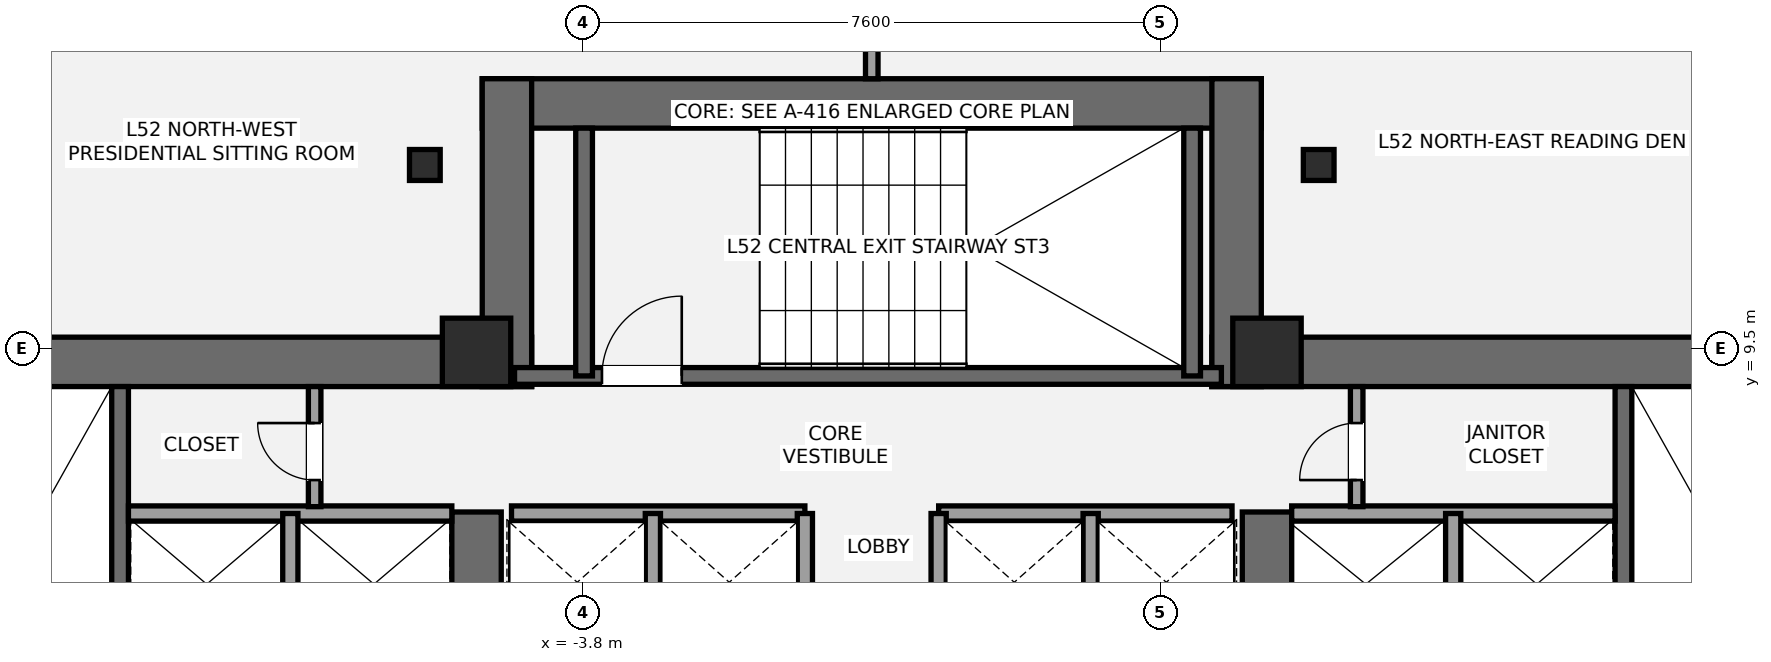
"""IFC4 building model, lengths in metres.
Left out: names, types, materials, properties, quantities, classifications, styles, units other than length and angle.
Written with IfcOpenShell. Run it as: python <this file> out.ifc"""

import sys

from ifc_helpers import new_model, si_unit, direction, frame, frame_2d, origin, origin_2d, place, context, subcontext, project, spatial, rectangle, i_section, extrude, element, fill, save


model = new_model("IFC4")
c1 = context("Model", 3, precision=1e-05, world=origin(), true_north=direction((0.0, 1.0)))
c2 = subcontext(c1, "Body", "Model", "MODEL_VIEW")
j1 = project(units=[si_unit("LENGTHUNIT", "METRE"), si_unit("PLANEANGLEUNIT", "RADIAN")], contexts=[c1])
p1 = place(None, origin())
s1 = spatial("IfcSite", under=j1, at=p1, CompositionType="ELEMENT")
p2 = place(p1, origin())
s2 = spatial("IfcBuilding", under=s1, at=p2, CompositionType="ELEMENT")
p3 = place(p2, frame((0.0, 0.0, 188.6)))
s3 = spatial("IfcBuildingStorey", under=s2, at=p3, CompositionType="ELEMENT", Elevation=188.6)
p4 = place(p3, frame((-13.8, 9.325, 0.0), z_axis=(0.0, 0.0, 1.0), x_axis=(1.0, 0.0, 0.0)))
e1 = element("IfcWall", 1, at=p4, inside=s3, PredefinedType="SHEAR", context=c2, shape_type="SweptSolid", body=[
    extrude(rectangle(XDim=9.325, YDim=0.65, at=frame_2d((4.663, 0.0))), origin(), (0.0, 0.0, 1.0), 3.2),
])
p5 = place(p3, frame((-5.2, 5.35, 0.0), z_axis=(0.0, 0.0, 1.0), x_axis=(0.0, 1.0, 0.0)))
e2 = element("IfcWall", 2, at=p5, inside=s3, PredefinedType="SHEAR", context=c2, shape_type="SweptSolid", body=[
    extrude(rectangle(XDim=2.0, YDim=0.65, at=frame_2d((1.0, 0.0))), origin(), (0.0, 0.0, 1.0), 3.2),
])
p6 = place(p3, frame((-9.89, 1.85, 0.0), z_axis=(0.0, 0.0, 1.0), x_axis=(0.0, 1.0, 0.0)))
e3 = element("IfcWall", 3, at=p6, inside=s3, PredefinedType="SHEAR", context=c2, shape_type="SweptSolid", body=[
    extrude(rectangle(XDim=7.15, YDim=0.22, at=frame_2d((3.575, 0.0))), origin(), (0.0, 0.0, 1.0), 3.2),
])
p7 = place(p3, frame((4.475, 9.325, 0.0), z_axis=(0.0, 0.0, 1.0), x_axis=(1.0, 0.0, 0.0)))
e4 = element("IfcWall", 4, at=p7, inside=s3, PredefinedType="SHEAR", context=c2, shape_type="SweptSolid", body=[
    extrude(rectangle(XDim=9.325, YDim=0.65, at=frame_2d((4.663, 0.0))), origin(), (0.0, 0.0, 1.0), 3.2),
])
p8 = place(p3, frame((5.2, 5.35, 0.0), z_axis=(0.0, 0.0, 1.0), x_axis=(0.0, 1.0, 0.0)))
e5 = element("IfcWall", 5, at=p8, inside=s3, PredefinedType="SHEAR", context=c2, shape_type="SweptSolid", body=[
    extrude(rectangle(XDim=2.0, YDim=0.65, at=frame_2d((1.0, 0.0))), origin(), (0.0, 0.0, 1.0), 3.2),
])
p9 = place(p3, frame((9.89, 1.85, 0.0), z_axis=(0.0, 0.0, 1.0), x_axis=(0.0, 1.0, 0.0)))
e6 = element("IfcWall", 6, at=p9, inside=s3, PredefinedType="SHEAR", context=c2, shape_type="SweptSolid", body=[
    extrude(rectangle(XDim=7.15, YDim=0.22, at=frame_2d((3.575, 0.0))), origin(), (0.0, 0.0, 1.0), 3.2),
])
p10 = place(p3, frame((-5.125, 12.725, 0.0), z_axis=(0.0, 0.0, 1.0), x_axis=(1.0, 0.0, 0.0)))
e7 = element("IfcWall", 7, at=p10, inside=s3, PredefinedType="SHEAR", context=c2, shape_type="SweptSolid", body=[
    extrude(rectangle(XDim=10.25, YDim=0.65, at=frame_2d((5.125, 0.0))), origin(), (0.0, 0.0, 1.0), 3.2),
])
for number, where, z_axis, x_axis in (
    (8, (-4.8, 9.0, 0.0), (0.0, 0.0, 1.0), (0.0, 1.0, 0.0)),
    (9, (4.8, 9.0, 0.0), (0.0, 0.0, 1.0), (0.0, 1.0, 0.0)),
):
    element("IfcWall", number, at=place(p3, frame(where, z_axis=z_axis, x_axis=x_axis)), inside=s3, PredefinedType="SHEAR", context=c2, shape_type="SweptSolid", body=[
        extrude(rectangle(XDim=4.05, YDim=0.65, at=frame_2d((2.025, 0.0))), origin(), (0.0, 0.0, 1.0), 3.2),
    ])
p11 = place(p3, frame((-4.7, 9.14, 0.0), z_axis=(0.0, 0.0, 1.0), x_axis=(1.0, 0.0, 0.0)))
e10 = element("IfcWall", 10, at=p11, inside=s3, PredefinedType="SHEAR", context=c2, shape_type="SweptSolid", body=[
    extrude(rectangle(XDim=9.3, YDim=0.22, at=frame_2d((4.65, 0.0))), origin(), (0.0, 0.0, 1.0), 3.2),
])
p12 = place(p11, frame((1.15, 0.0, 0.0)))
e11 = element("IfcOpeningElement", 11, at=p12, cuts=e10, PredefinedType="OPENING", context=c2, shape_type="SweptSolid", body=[
    extrude(rectangle(XDim=1.05, YDim=2.15, at=frame_2d((0.525, 1.075))), frame((0.0, 0.12, 0.0), z_axis=(0.0, -1.0, 0.0), x_axis=(1.0, 0.0, 0.0)), (0.0, 0.0, 1.0), 0.24),
])
for number, where, z_axis, x_axis in (
    (12, (-3.785, 9.14, 0.0), (0.0, 0.0, 1.0), (0.0, 1.0, 0.0)),
    (13, (4.215, 9.14, 0.0), (0.0, 0.0, 1.0), (0.0, 1.0, 0.0)),
):
    element("IfcWall", number, at=place(p3, frame(where, z_axis=z_axis, x_axis=x_axis)), inside=s3, PredefinedType="SHEAR", context=c2, shape_type="SweptSolid", body=[
        extrude(rectangle(XDim=3.26, YDim=0.22, at=frame_2d((1.63, 0.0))), origin(), (0.0, 0.0, 1.0), 3.2),
    ])
for number, where, z_axis, x_axis in (
    (14, (-5.2, 9.45, 0.0), (0.0, 0.0, 1.0), (1.0, 0.0, 0.0)),
    (15, (5.2, 9.45, 0.0), (0.0, 0.0, 1.0), (1.0, 0.0, 0.0)),
):
    element("IfcColumn", number, at=place(p3, frame(where, z_axis=z_axis, x_axis=x_axis)), inside=s3, PredefinedType="COLUMN", context=c2, shape_type="SweptSolid", body=[
        extrude(rectangle(XDim=0.9, YDim=0.9, at=origin_2d()), origin(), (0.0, 0.0, 1.0), 3.2),
    ])
for number, where, z_axis, x_axis in (
    (16, (5.88, 11.915, 0.0), (0.0, 0.0, 1.0), (1.0, 0.0, 0.0)),
    (17, (-5.88, 11.915, 0.0), (0.0, 0.0, 1.0), (1.0, 0.0, 0.0)),
):
    element("IfcColumn", number, at=place(p3, frame(where, z_axis=z_axis, x_axis=x_axis)), inside=s3, PredefinedType="COLUMN", context=c2, shape_type="SweptSolid", body=[
        extrude(i_section(OverallWidth=0.404, OverallDepth=0.407, WebThickness=0.027, FlangeThickness=0.044, at=origin_2d()), origin(), (0.0, 0.0, 1.0), 3.2),
    ])
p13 = place(p3, frame((-9.78, 7.33, 0.0), z_axis=(0.0, 0.0, 1.0), x_axis=(1.0, 0.0, 0.0)))
e18 = element("IfcWall", 18, at=p13, inside=s3, PredefinedType="SOLIDWALL", context=c2, shape_type="SweptSolid", body=[
    extrude(rectangle(XDim=4.255, YDim=0.2, at=frame_2d((2.127, 0.0))), origin(), (0.0, 0.0, 1.0), 3.02),
])
p14 = place(p3, frame((-7.65, 5.47, 0.0), z_axis=(0.0, 0.0, 1.0), x_axis=(0.0, 1.0, 0.0)))
e19 = element("IfcWall", 19, at=p14, inside=s3, PredefinedType="SOLIDWALL", context=c2, shape_type="SweptSolid", body=[
    extrude(rectangle(XDim=1.86, YDim=0.2, at=frame_2d((0.93, 0.0))), origin(), (0.0, 0.0, 1.0), 3.02),
])
p15 = place(p3, frame((5.525, 7.33, 0.0), z_axis=(0.0, 0.0, 1.0), x_axis=(1.0, 0.0, 0.0)))
e20 = element("IfcWall", 20, at=p15, inside=s3, PredefinedType="SOLIDWALL", context=c2, shape_type="SweptSolid", body=[
    extrude(rectangle(XDim=4.255, YDim=0.2, at=frame_2d((2.127, 0.0))), origin(), (0.0, 0.0, 1.0), 3.02),
])
p16 = place(p3, frame((7.65, 5.47, 0.0), z_axis=(0.0, 0.0, 1.0), x_axis=(0.0, 1.0, 0.0)))
e21 = element("IfcWall", 21, at=p16, inside=s3, PredefinedType="SOLIDWALL", context=c2, shape_type="SweptSolid", body=[
    extrude(rectangle(XDim=1.86, YDim=0.2, at=frame_2d((0.93, 0.0))), origin(), (0.0, 0.0, 1.0), 3.02),
])
for number, where, z_axis, x_axis in (
    (22, (-4.74, 7.33, 0.0), (0.0, 0.0, 1.0), (1.0, 0.0, 0.0)),
    (23, (0.88, 7.33, 0.0), (0.0, 0.0, 1.0), (1.0, 0.0, 0.0)),
):
    element("IfcWall", number, at=place(p3, frame(where, z_axis=z_axis, x_axis=x_axis)), inside=s3, PredefinedType="SOLIDWALL", context=c2, shape_type="SweptSolid", body=[
        extrude(rectangle(XDim=3.86, YDim=0.2, at=frame_2d((1.93, 0.0))), origin(), (0.0, 0.0, 1.0), 3.02),
    ])
for number, where, z_axis, x_axis in (
    (24, (-2.88, 5.52, 0.0), (0.0, 0.0, 1.0), (0.0, 1.0, 0.0)),
    (25, (2.88, 5.52, 0.0), (0.0, 0.0, 1.0), (0.0, 1.0, 0.0)),
    (26, (-0.88, 5.52, 0.0), (0.0, 0.0, 1.0), (0.0, 1.0, 0.0)),
    (27, (0.88, 5.52, 0.0), (0.0, 0.0, 1.0), (0.0, 1.0, 0.0)),
):
    element("IfcWall", number, at=place(p3, frame(where, z_axis=z_axis, x_axis=x_axis)), inside=s3, PredefinedType="SOLIDWALL", context=c2, shape_type="SweptSolid", body=[
        extrude(rectangle(XDim=1.81, YDim=0.2, at=frame_2d((0.905, 0.0))), origin(), (0.0, 0.0, 1.0), 3.02),
    ])
p17 = place(p3, frame((-7.33, 7.42, 0.0), z_axis=(0.0, 0.0, 1.0), x_axis=(0.0, 1.0, 0.0)))
e28 = element("IfcWall", 28, at=p17, inside=s3, PredefinedType="PARTITIONING", context=c2, shape_type="SweptSolid", body=[
    extrude(rectangle(XDim=1.58, YDim=0.165, at=frame_2d((0.79, 0.0))), origin(), (0.0, 0.0, 1.0), 3.02),
])
p18 = place(p17, frame((0.35, 0.0, 0.0)))
e29 = element("IfcOpeningElement", 29, at=p18, cuts=e28, PredefinedType="OPENING", context=c2, shape_type="SweptSolid", body=[
    extrude(rectangle(XDim=0.75, YDim=2.1, at=frame_2d((0.375, 1.05))), frame((0.0, 0.093, 0.0), z_axis=(0.0, -1.0, 0.0), x_axis=(1.0, 0.0, 0.0)), (0.0, 0.0, 1.0), 0.185),
])
p19 = place(p3, frame((6.38, 7.42, 0.0), z_axis=(0.0, 0.0, 1.0), x_axis=(0.0, 1.0, 0.0)))
e30 = element("IfcWall", 30, at=p19, inside=s3, PredefinedType="PARTITIONING", context=c2, shape_type="SweptSolid", body=[
    extrude(rectangle(XDim=1.58, YDim=0.165, at=frame_2d((0.79, 0.0))), origin(), (0.0, 0.0, 1.0), 3.02),
])
p20 = place(p19, frame((0.35, 0.0, 0.0)))
e31 = element("IfcOpeningElement", 31, at=p20, cuts=e30, PredefinedType="OPENING", context=c2, shape_type="SweptSolid", body=[
    extrude(rectangle(XDim=0.75, YDim=2.1, at=frame_2d((0.375, 1.05))), frame((0.0, 0.093, 0.0), z_axis=(0.0, -1.0, 0.0), x_axis=(1.0, 0.0, 0.0)), (0.0, 0.0, 1.0), 0.185),
])
p21 = place(p3, frame((0.0, 13.05, 0.0), z_axis=(0.0, 0.0, 1.0), x_axis=(0.0, 1.0, 0.0)))
e32 = element("IfcWall", 32, at=p21, inside=s3, PredefinedType="PARTITIONING", context=c2, shape_type="SweptSolid", body=[
    extrude(rectangle(XDim=3.219, YDim=0.165, at=frame_2d((1.609, 0.0))), origin(), (0.0, 0.0, 1.0), 3.02),
])
p22 = place(p12, origin())
e33 = element("IfcDoor", 33, at=p22, inside=s3, OperationType="SINGLE_SWING_RIGHT", PredefinedType="DOOR", context=c2, shape_type="SweptSolid", body=[
    extrude(rectangle(XDim=1.05, YDim=2.15, at=frame_2d((0.525, 1.075))), frame((0.0, 0.025, 0.0), z_axis=(0.0, -1.0, 0.0), x_axis=(1.0, 0.0, 0.0)), (0.0, 0.0, 1.0), 0.05),
])
fill(e11, e33)
p23 = place(p18, origin())
e34 = element("IfcDoor", 34, at=p23, inside=s3, OperationType="SINGLE_SWING_RIGHT", PredefinedType="DOOR", context=c2, shape_type="SweptSolid", body=[
    extrude(rectangle(XDim=0.75, YDim=2.1, at=frame_2d((0.375, 1.05))), frame((0.0, 0.025, 0.0), z_axis=(0.0, -1.0, 0.0), x_axis=(1.0, 0.0, 0.0)), (0.0, 0.0, 1.0), 0.05),
])
fill(e29, e34)
p24 = place(p20, origin())
e35 = element("IfcDoor", 35, at=p24, inside=s3, OperationType="SINGLE_SWING_LEFT", PredefinedType="DOOR", context=c2, shape_type="SweptSolid", body=[
    extrude(rectangle(XDim=0.75, YDim=2.1, at=frame_2d((0.375, 1.05))), frame((0.0, 0.025, 0.0), z_axis=(0.0, -1.0, 0.0), x_axis=(1.0, 0.0, 0.0)), (0.0, 0.0, 1.0), 0.05),
])
fill(e31, e35)
save(model, sys.argv[1])
